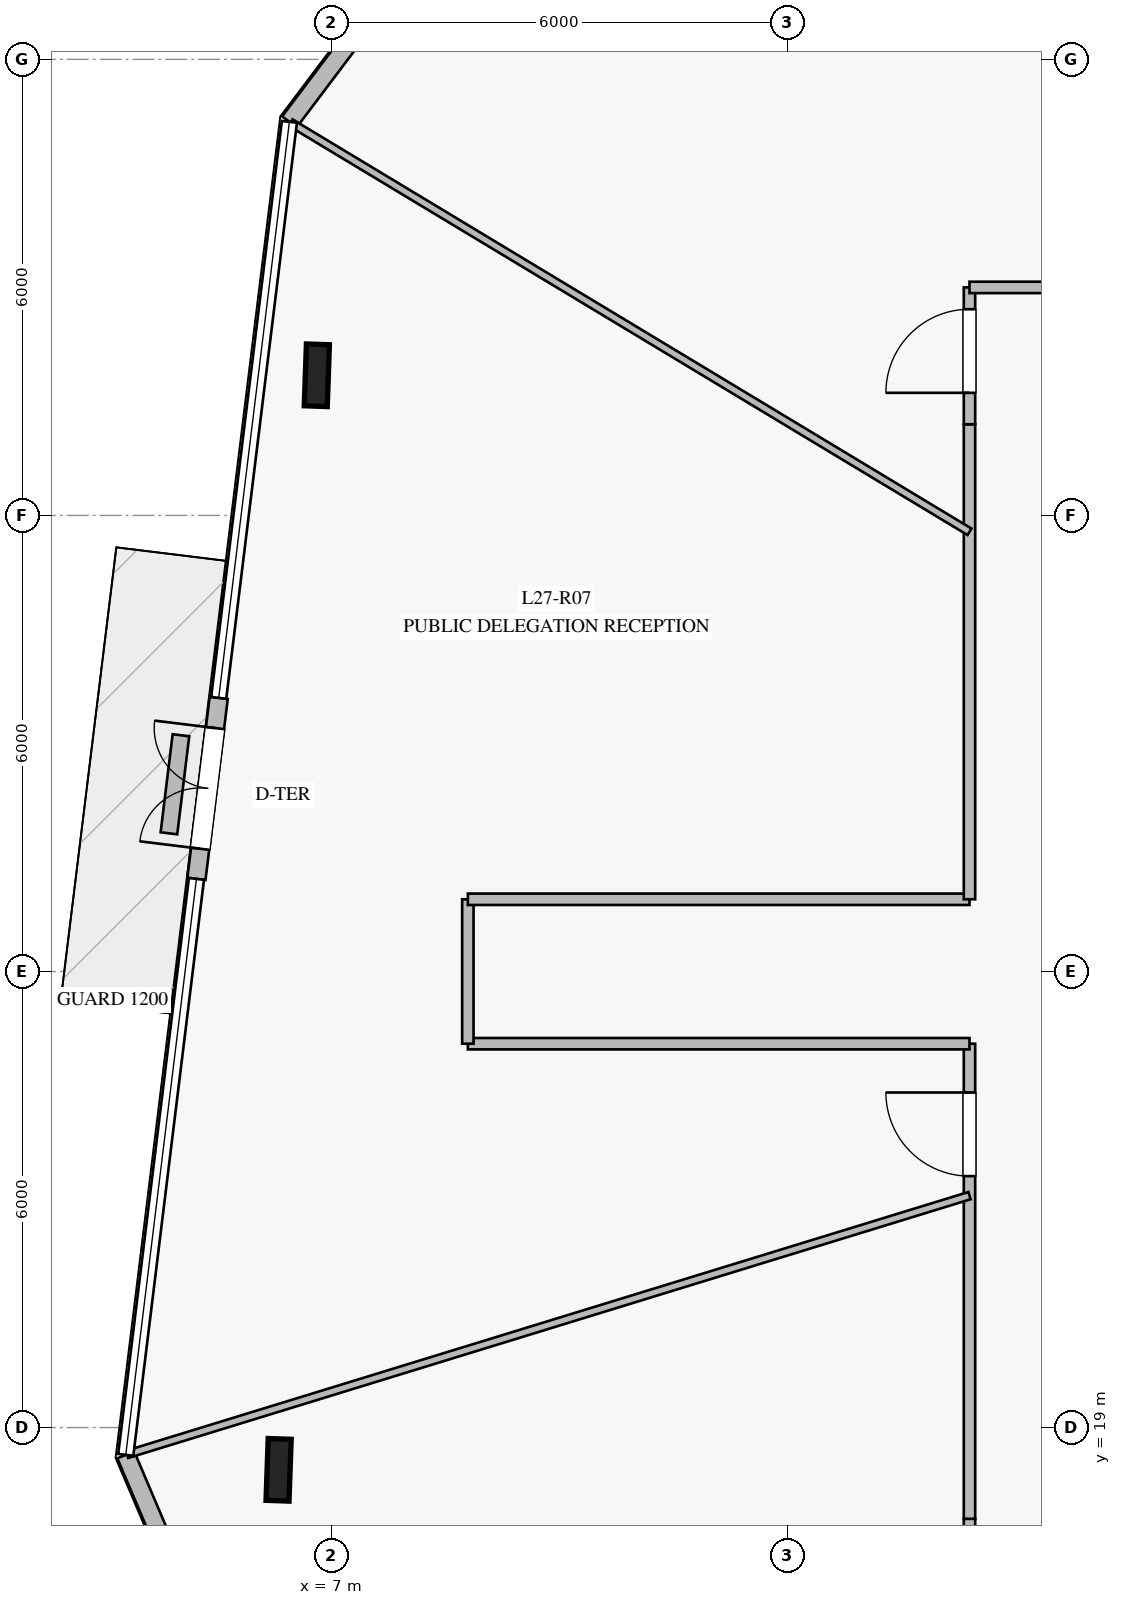
"""IFC4 building model, lengths in metres.
Left out: names, types, materials, properties, quantities, classifications, styles, units other than length and angle.
Written with IfcOpenShell. Run it as: python <this file> out.ifc"""

import sys

from ifc_helpers import new_model, si_unit, direction, frame, frame_2d, origin, origin_2d, place, context, subcontext, project, spatial, rectangle, i_section, extrude, element, fill, save


model = new_model("IFC4")
c1 = context("Model", 3, precision=1e-05, world=origin(), true_north=direction((0.0, 1.0)))
c2 = subcontext(c1, "Body", "Model", "MODEL_VIEW")
j1 = project(units=[si_unit("LENGTHUNIT", "METRE"), si_unit("PLANEANGLEUNIT", "RADIAN")], contexts=[c1])
p1 = place(None, origin())
s1 = spatial("IfcSite", under=j1, at=p1, CompositionType="ELEMENT")
p2 = place(p1, origin())
s2 = spatial("IfcBuilding", under=s1, at=p2, CompositionType="ELEMENT")
p3 = place(p2, frame((0.0, 0.0, 114.4)))
s3 = spatial("IfcBuildingStorey", under=s2, at=p3, CompositionType="ELEMENT", Elevation=114.4)
for number, where, z_axis, x_axis in (
    (1, (6.813, 32.844, 0.0), (0.0, 0.0, 1.0), (0.035, 0.999, 0.0)),
    (2, (6.31, 18.444, 0.0), (0.0, 0.0, 1.0), (0.035, 0.999, 0.0)),
):
    element("IfcColumn", number, at=place(p3, frame(where, z_axis=z_axis, x_axis=x_axis)), inside=s3, PredefinedType="COLUMN", context=c2, shape_type="SweptSolid", body=[
        extrude(i_section(OverallWidth=0.303, OverallDepth=0.814, WebThickness=0.021, FlangeThickness=0.04, at=origin_2d()), origin(), (0.0, 0.0, 1.0), 4.0),
    ])
p4 = place(p3, frame((9.143, 39.749, 0.0), z_axis=(0.0, 0.0, 1.0), x_axis=(-0.601841660076, -0.798615436989, 0.0)))
e3 = element("IfcWall", 3, at=p4, inside=s3, PredefinedType="STANDARD", context=c2, shape_type="SweptSolid", body=[
    extrude(rectangle(XDim=4.471, YDim=0.24, at=frame_2d((2.236, 0.0))), origin(), (0.0, 0.0, 1.0), 3.76),
])
p5 = place(p3, frame((5.522, 28.6, 0.0), z_axis=(0.0, 0.0, 1.0), x_axis=(-0.122068869435, -0.992521632568, 0.0)))
e4 = element("IfcWall", 4, at=p5, inside=s3, PredefinedType="STANDARD", context=c2, shape_type="SweptSolid", body=[
    extrude(rectangle(XDim=2.4, YDim=0.24, at=frame_2d((1.2, 0.0))), origin(), (0.0, 0.0, 1.0), 3.76),
])
p6 = place(p5, frame((0.4, 0.0, 0.0)))
e5 = element("IfcOpeningElement", 5, at=p6, cuts=e4, PredefinedType="OPENING", context=c2, shape_type="SweptSolid", body=[
    extrude(rectangle(XDim=1.6, YDim=2.25, at=frame_2d((0.8, 1.125))), frame((0.0, 0.13, 0.0), z_axis=(0.0, -1.0, 0.0), x_axis=(1.0, 0.0, 0.0)), (0.0, 0.0, 1.0), 0.26),
])
p7 = place(p3, frame((4.299, 18.641, 0.0), z_axis=(0.0, 0.0, 1.0), x_axis=(0.390733557702, -0.920503822309, 0.0)))
e6 = element("IfcWall", 6, at=p7, inside=s3, PredefinedType="STANDARD", context=c2, shape_type="SweptSolid", body=[
    extrude(rectangle(XDim=4.471, YDim=0.24, at=frame_2d((2.235, 0.0))), origin(), (0.0, 0.0, 1.0), 3.76),
])
p8 = place(p3, frame((5.025, 28.108, 0.0), z_axis=(0.0, 0.0, 1.0), x_axis=(-0.121560078921, -0.992584075639, 0.0)))
e7 = element("IfcWall", 7, at=p8, inside=s3, PredefinedType="USERDEFINED", context=c2, shape_type="SweptSolid", body=[
    extrude(rectangle(XDim=1.299, YDim=0.22, at=frame_2d((0.65, 0.0))), origin(), (0.0, 0.0, 1.0), 0.4),
])
p9 = place(p3, frame((15.4, 16.0, 0.0), z_axis=(0.0, 0.0, 1.0), x_axis=(0.0, 1.0, 0.0)))
e8 = element("IfcWall", 8, at=p9, inside=s3, PredefinedType="PARTITIONING", context=c2, shape_type="SweptSolid", body=[
    extrude(rectangle(XDim=1.8, YDim=0.15, at=frame_2d((0.9, 0.0))), origin(), (0.0, 0.0, 1.0), 3.21),
])
p10 = place(p3, frame((15.4, 17.8, 0.0), z_axis=(0.0, 0.0, 1.0), x_axis=(0.0, 1.0, 0.0)))
e9 = element("IfcWall", 9, at=p10, inside=s3, PredefinedType="PARTITIONING", context=c2, shape_type="SweptSolid", body=[
    extrude(rectangle(XDim=6.25, YDim=0.15, at=frame_2d((3.125, 0.0))), origin(), (0.0, 0.0, 1.0), 3.21),
])
p11 = place(p10, frame((4.508, 0.0, 0.0)))
e10 = element("IfcOpeningElement", 10, at=p11, cuts=e9, PredefinedType="OPENING", context=c2, shape_type="SweptSolid", body=[
    extrude(rectangle(XDim=1.1, YDim=2.2, at=frame_2d((0.55, 1.1))), frame((0.0, 0.085, 0.0), z_axis=(0.0, -1.0, 0.0), x_axis=(1.0, 0.0, 0.0)), (0.0, 0.0, 1.0), 0.17),
])
p12 = place(p3, frame((15.4, 24.05, 0.0), z_axis=(0.0, 0.0, 1.0), x_axis=(-1.0, 0.0, 0.0)))
e11 = element("IfcWall", 11, at=p12, inside=s3, PredefinedType="PARTITIONING", context=c2, shape_type="SweptSolid", body=[
    extrude(rectangle(XDim=6.6, YDim=0.15, at=frame_2d((3.3, 0.0))), origin(), (0.0, 0.0, 1.0), 3.05),
])
p13 = place(p3, frame((8.8, 24.05, 0.0), z_axis=(0.0, 0.0, 1.0), x_axis=(0.0, 1.0, 0.0)))
e12 = element("IfcWall", 12, at=p13, inside=s3, PredefinedType="PARTITIONING", context=c2, shape_type="SweptSolid", body=[
    extrude(rectangle(XDim=1.9, YDim=0.15, at=frame_2d((0.95, 0.0))), origin(), (0.0, 0.0, 1.0), 3.3),
])
p14 = place(p3, frame((8.8, 25.95, 0.0), z_axis=(0.0, 0.0, 1.0), x_axis=(1.0, 0.0, 0.0)))
e13 = element("IfcWall", 13, at=p14, inside=s3, PredefinedType="PARTITIONING", context=c2, shape_type="SweptSolid", body=[
    extrude(rectangle(XDim=6.6, YDim=0.15, at=frame_2d((3.3, 0.0))), origin(), (0.0, 0.0, 1.0), 3.05),
])
p15 = place(p3, frame((15.4, 25.95, 0.0), z_axis=(0.0, 0.0, 1.0), x_axis=(0.0, 1.0, 0.0)))
e14 = element("IfcWall", 14, at=p15, inside=s3, PredefinedType="PARTITIONING", context=c2, shape_type="SweptSolid", body=[
    extrude(rectangle(XDim=6.25, YDim=0.15, at=frame_2d((3.125, 0.0))), origin(), (0.0, 0.0, 1.0), 3.21),
])
p16 = place(p3, frame((15.4, 32.2, 0.0), z_axis=(0.0, 0.0, 1.0), x_axis=(0.0, 1.0, 0.0)))
e15 = element("IfcWall", 15, at=p16, inside=s3, PredefinedType="PARTITIONING", context=c2, shape_type="SweptSolid", body=[
    extrude(rectangle(XDim=1.8, YDim=0.15, at=frame_2d((0.9, 0.0))), origin(), (0.0, 0.0, 1.0), 3.21),
])
p17 = place(p16, frame((0.413, 0.0, 0.0)))
e16 = element("IfcOpeningElement", 16, at=p17, cuts=e15, PredefinedType="OPENING", context=c2, shape_type="SweptSolid", body=[
    extrude(rectangle(XDim=1.1, YDim=2.2, at=frame_2d((0.55, 1.1))), frame((0.0, 0.085, 0.0), z_axis=(0.0, -1.0, 0.0), x_axis=(1.0, 0.0, 0.0)), (0.0, 0.0, 1.0), 0.17),
])
p18 = place(p3, frame((15.4, 34.0, 0.0), z_axis=(0.0, 0.0, 1.0), x_axis=(1.0, 0.0, 0.0)))
e17 = element("IfcWall", 17, at=p18, inside=s3, PredefinedType="PARTITIONING", context=c2, shape_type="SweptSolid", body=[
    extrude(rectangle(XDim=1.8, YDim=0.15, at=frame_2d((0.9, 0.0))), origin(), (0.0, 0.0, 1.0), 3.76),
])
p19 = place(p3, frame((15.4, 30.785, 0.0), z_axis=(0.0, 0.0, 1.0), x_axis=(-0.856479099456, 0.51618170463, 0.0)))
e18 = element("IfcWall", 18, at=p19, inside=s3, PredefinedType="MOVABLE", context=c2, shape_type="SweptSolid", body=[
    extrude(rectangle(XDim=10.429, YDim=0.1, at=frame_2d((5.214, 0.0))), origin(), (0.0, 0.0, 1.0), 3.16),
])
p20 = place(p3, frame((15.4, 22.051, 0.0), z_axis=(0.0, 0.0, 1.0), x_axis=(-0.955926859448, -0.293604903544, 0.0)))
e19 = element("IfcWall", 19, at=p20, inside=s3, PredefinedType="MOVABLE", context=c2, shape_type="SweptSolid", body=[
    extrude(rectangle(XDim=11.594, YDim=0.1, at=frame_2d((5.797, 0.0))), origin(), (0.0, 0.0, 1.0), 3.05),
])
p21 = place(p6, frame((1.6, 0.0, 0.0), z_axis=(0.0, 0.0, 1.0), x_axis=(-1.0, 0.0, 0.0)))
e20 = element("IfcDoor", 20, at=p21, inside=s3, OperationType="DOUBLE_DOOR_SINGLE_SWING", PredefinedType="DOOR", context=c2, shape_type="SweptSolid", body=[
    extrude(rectangle(XDim=1.6, YDim=2.25, at=frame_2d((0.8, 1.125))), frame((0.0, 0.025, 0.0), z_axis=(0.0, -1.0, 0.0), x_axis=(1.0, 0.0, 0.0)), (0.0, 0.0, 1.0), 0.05),
])
fill(e5, e20)
p22 = place(p17, origin())
e21 = element("IfcDoor", 21, at=p22, inside=s3, OperationType="SINGLE_SWING_LEFT", PredefinedType="DOOR", context=c2, shape_type="SweptSolid", body=[
    extrude(rectangle(XDim=1.1, YDim=2.2, at=frame_2d((0.55, 1.1))), frame((0.0, 0.025, 0.0), z_axis=(0.0, -1.0, 0.0), x_axis=(1.0, 0.0, 0.0)), (0.0, 0.0, 1.0), 0.05),
])
fill(e16, e21)
p23 = place(p11, origin())
e22 = element("IfcDoor", 22, at=p23, inside=s3, OperationType="SINGLE_SWING_RIGHT", PredefinedType="DOOR", context=c2, shape_type="SweptSolid", body=[
    extrude(rectangle(XDim=1.1, YDim=2.2, at=frame_2d((0.55, 1.1))), frame((0.0, 0.025, 0.0), z_axis=(0.0, -1.0, 0.0), x_axis=(1.0, 0.0, 0.0)), (0.0, 0.0, 1.0), 0.05),
])
fill(e10, e22)
save(model, sys.argv[1])
